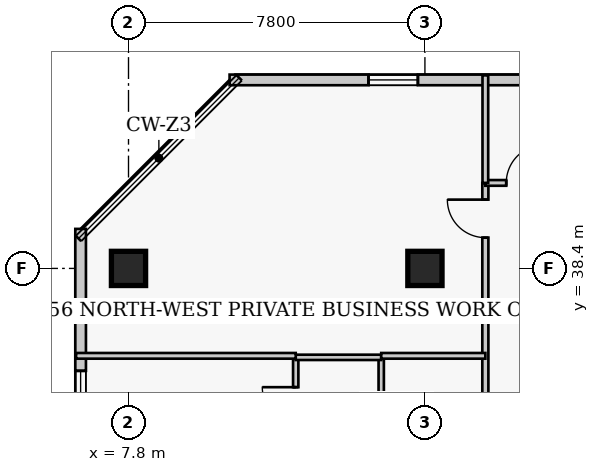
"""IFC4 building model, lengths in metres.
Left out: names, types, materials, properties, quantities, classifications, styles, units other than length and angle.
Written with IfcOpenShell. Run it as: python <this file> out.ifc"""

import sys

from ifc_helpers import new_model, si_unit, direction, frame, frame_2d, origin, origin_2d, place, context, subcontext, project, spatial, rectangle, extrude, element, fill, save


model = new_model("IFC4")
c1 = context("Model", 3, precision=1e-05, world=origin(), true_north=direction((0.0, 1.0)))
c2 = subcontext(c1, "Body", "Model", "MODEL_VIEW")
j1 = project(units=[si_unit("LENGTHUNIT", "METRE"), si_unit("PLANEANGLEUNIT", "RADIAN")], contexts=[c1])
p1 = place(None, origin())
s1 = spatial("IfcSite", under=j1, at=p1, CompositionType="ELEMENT")
p2 = place(p1, origin())
s2 = spatial("IfcBuilding", under=s1, at=p2, CompositionType="ELEMENT")
p3 = place(p2, frame((0.0, 0.0, 224.1)))
s3 = spatial("IfcBuildingStorey", under=s2, at=p3, CompositionType="ELEMENT", Elevation=224.1)
for number, where, z_axis, x_axis in (
    (1, (7.8, 38.4, 0.0), (0.0, 0.0, 1.0), (1.0, 0.0, 0.0)),
    (2, (15.6, 38.4, 0.0), (0.0, 0.0, 1.0), (1.0, 0.0, 0.0)),
):
    element("IfcColumn", number, at=place(p3, frame(where, z_axis=z_axis, x_axis=x_axis)), inside=s3, PredefinedType="COLUMN", context=c2, shape_type="SweptSolid", body=[
        extrude(rectangle(XDim=0.9, YDim=0.9, at=origin_2d()), origin(), (0.0, 0.0, 1.0), 3.9),
    ])
p4 = place(p3, frame((36.29, 43.36, 0.0), z_axis=(0.0, 0.0, 1.0), x_axis=(-1.0, 0.0, 0.0)))
e3 = element("IfcWall", 3, at=p4, inside=s3, PredefinedType="SOLIDWALL", context=c2, shape_type="SweptSolid", body=[
    extrude(rectangle(XDim=25.83, YDim=0.28, at=frame_2d((12.915, 0.0))), origin(), (0.0, 0.0, 1.0), 3.65),
])
p5 = place(p4, frame((3.005, 0.0, 0.85)))
e4 = element("IfcOpeningElement", 4, at=p5, cuts=e3, PredefinedType="OPENING", context=c2, shape_type="SweptSolid", body=[
    extrude(rectangle(XDim=1.3, YDim=1.7, at=frame_2d((0.65, 0.85))), frame((0.0, 0.15, 0.0), z_axis=(0.0, -1.0, 0.0), x_axis=(1.0, 0.0, 0.0)), (0.0, 0.0, 1.0), 0.3),
])
p6 = place(p4, frame((12.265, 0.0, 0.85)))
e5 = element("IfcOpeningElement", 5, at=p6, cuts=e3, PredefinedType="OPENING", context=c2, shape_type="SweptSolid", body=[
    extrude(rectangle(XDim=1.3, YDim=1.7, at=frame_2d((0.65, 0.85))), frame((0.0, 0.15, 0.0), z_axis=(0.0, -1.0, 0.0), x_axis=(1.0, 0.0, 0.0)), (0.0, 0.0, 1.0), 0.3),
])
p7 = place(p4, frame((20.875, 0.0, 0.85)))
e6 = element("IfcOpeningElement", 6, at=p7, cuts=e3, PredefinedType="OPENING", context=c2, shape_type="SweptSolid", body=[
    extrude(rectangle(XDim=1.3, YDim=1.7, at=frame_2d((0.65, 0.85))), frame((0.0, 0.15, 0.0), z_axis=(0.0, -1.0, 0.0), x_axis=(1.0, 0.0, 0.0)), (0.0, 0.0, 1.0), 0.3),
])
p8 = place(p3, frame((6.54, 39.44, 0.0), z_axis=(0.0, 0.0, 1.0), x_axis=(0.0, -1.0, 0.0)))
e7 = element("IfcWall", 7, at=p8, inside=s3, PredefinedType="SOLIDWALL", context=c2, shape_type="SweptSolid", body=[
    extrude(rectangle(XDim=29.88, YDim=0.28, at=frame_2d((14.94, 0.0))), origin(), (0.0, 0.0, 1.0), 3.65),
])
p9 = place(p8, frame((3.735, 0.0, 0.85)))
e8 = element("IfcOpeningElement", 8, at=p9, cuts=e7, PredefinedType="OPENING", context=c2, shape_type="SweptSolid", body=[
    extrude(rectangle(XDim=1.3, YDim=1.7, at=frame_2d((0.65, 0.85))), frame((0.0, 0.15, 0.0), z_axis=(0.0, -1.0, 0.0), x_axis=(1.0, 0.0, 0.0)), (0.0, 0.0, 1.0), 0.3),
])
p10 = place(p8, frame((11.205, 0.0, 0.85)))
e9 = element("IfcOpeningElement", 9, at=p10, cuts=e7, PredefinedType="OPENING", context=c2, shape_type="SweptSolid", body=[
    extrude(rectangle(XDim=1.3, YDim=1.7, at=frame_2d((0.65, 0.85))), frame((0.0, 0.15, 0.0), z_axis=(0.0, -1.0, 0.0), x_axis=(1.0, 0.0, 0.0)), (0.0, 0.0, 1.0), 0.3),
])
p11 = place(p8, frame((17.375, 0.0, 0.85)))
e10 = element("IfcOpeningElement", 10, at=p11, cuts=e7, PredefinedType="OPENING", context=c2, shape_type="SweptSolid", body=[
    extrude(rectangle(XDim=1.3, YDim=1.7, at=frame_2d((0.65, 0.85))), frame((0.0, 0.15, 0.0), z_axis=(0.0, -1.0, 0.0), x_axis=(1.0, 0.0, 0.0)), (0.0, 0.0, 1.0), 0.3),
])
p12 = place(p8, frame((25.495, 0.0, 0.85)))
e11 = element("IfcOpeningElement", 11, at=p12, cuts=e7, PredefinedType="OPENING", context=c2, shape_type="SweptSolid", body=[
    extrude(rectangle(XDim=1.3, YDim=1.7, at=frame_2d((0.65, 0.85))), frame((0.0, 0.15, 0.0), z_axis=(0.0, -1.0, 0.0), x_axis=(1.0, 0.0, 0.0)), (0.0, 0.0, 1.0), 0.3),
])
p13 = place(p3, frame((17.19, 7.55, 0.0), z_axis=(0.0, 0.0, 1.0), x_axis=(0.0, 1.0, 0.0)))
e12 = element("IfcWall", 12, at=p13, inside=s3, PredefinedType="PARTITIONING", context=c2, shape_type="SweptSolid", body=[
    extrude(rectangle(XDim=33.1, YDim=0.16, at=frame_2d((16.55, 0.0))), origin(), (0.0, 0.0, 1.0), 3.65),
])
p14 = place(p13, frame((1.35, 0.0, 0.0)))
e13 = element("IfcOpeningElement", 13, at=p14, cuts=e12, PredefinedType="OPENING", context=c2, shape_type="SweptSolid", body=[
    extrude(rectangle(XDim=0.95, YDim=2.1, at=frame_2d((0.475, 1.05))), frame((0.0, 0.09, 0.0), z_axis=(0.0, -1.0, 0.0), x_axis=(1.0, 0.0, 0.0)), (0.0, 0.0, 1.0), 0.18),
])
p15 = place(p13, frame((7.575, 0.0, 0.0)))
e14 = element("IfcOpeningElement", 14, at=p15, cuts=e12, PredefinedType="OPENING", context=c2, shape_type="SweptSolid", body=[
    extrude(rectangle(XDim=0.95, YDim=2.1, at=frame_2d((0.475, 1.05))), frame((0.0, 0.09, 0.0), z_axis=(0.0, -1.0, 0.0), x_axis=(1.0, 0.0, 0.0)), (0.0, 0.0, 1.0), 0.18),
])
p16 = place(p13, frame((16.375, 0.0, 0.0)))
e15 = element("IfcOpeningElement", 15, at=p16, cuts=e12, PredefinedType="OPENING", context=c2, shape_type="SweptSolid", body=[
    extrude(rectangle(XDim=0.95, YDim=2.1, at=frame_2d((0.475, 1.05))), frame((0.0, 0.09, 0.0), z_axis=(0.0, -1.0, 0.0), x_axis=(1.0, 0.0, 0.0)), (0.0, 0.0, 1.0), 0.18),
])
p17 = place(p13, frame((24.425, 0.0, 0.0)))
e16 = element("IfcOpeningElement", 16, at=p17, cuts=e12, PredefinedType="OPENING", context=c2, shape_type="SweptSolid", body=[
    extrude(rectangle(XDim=0.95, YDim=2.1, at=frame_2d((0.475, 1.05))), frame((0.0, 0.09, 0.0), z_axis=(0.0, -1.0, 0.0), x_axis=(1.0, 0.0, 0.0)), (0.0, 0.0, 1.0), 0.18),
])
p18 = place(p13, frame((31.66, 0.0, 0.0)))
e17 = element("IfcOpeningElement", 17, at=p18, cuts=e12, PredefinedType="OPENING", context=c2, shape_type="SweptSolid", body=[
    extrude(rectangle(XDim=1.0, YDim=2.15, at=frame_2d((0.5, 1.075))), frame((0.0, 0.09, 0.0), z_axis=(0.0, -1.0, 0.0), x_axis=(1.0, 0.0, 0.0)), (0.0, 0.0, 1.0), 0.18),
])
p19 = place(p3, frame((17.19, 40.65, 0.0), z_axis=(0.0, 0.0, 1.0), x_axis=(1.0, 0.0, 0.0)))
e18 = element("IfcWall", 18, at=p19, inside=s3, PredefinedType="PARTITIONING", context=c2, shape_type="SweptSolid", body=[
    extrude(rectangle(XDim=4.91, YDim=0.15, at=frame_2d((2.455, 0.0))), origin(), (0.0, 0.0, 1.0), 3.65),
])
p20 = place(p19, frame((0.55, 0.0, 0.0)))
e19 = element("IfcOpeningElement", 19, at=p20, cuts=e18, PredefinedType="OPENING", context=c2, shape_type="SweptSolid", body=[
    extrude(rectangle(XDim=1.0, YDim=2.15, at=frame_2d((0.5, 1.075))), frame((0.0, 0.085, 0.0), z_axis=(0.0, -1.0, 0.0), x_axis=(1.0, 0.0, 0.0)), (0.0, 0.0, 1.0), 0.17),
])
p21 = place(p3, frame((17.19, 40.65, 0.0), z_axis=(0.0, 0.0, 1.0), x_axis=(0.0, 1.0, 0.0)))
e20 = element("IfcWall", 20, at=p21, inside=s3, PredefinedType="PARTITIONING", context=c2, shape_type="SweptSolid", body=[
    extrude(rectangle(XDim=2.83, YDim=0.15, at=frame_2d((1.415, 0.0))), origin(), (0.0, 0.0, 1.0), 3.65),
])
p22 = place(p3, frame((12.2, 33.61, 0.0), z_axis=(0.0, 0.0, 1.0), x_axis=(0.0, 1.0, 0.0)))
e21 = element("IfcWall", 21, at=p22, inside=s3, PredefinedType="PLUMBINGWALL", context=c2, shape_type="SweptSolid", body=[
    extrude(rectangle(XDim=2.45, YDim=0.14, at=frame_2d((1.225, 0.0))), origin(), (0.0, 0.0, 1.0), 3.65),
])
p23 = place(p22, frame((0.785, 0.0, 0.0)))
e22 = element("IfcOpeningElement", 22, at=p23, cuts=e21, PredefinedType="OPENING", context=c2, shape_type="SweptSolid", body=[
    extrude(rectangle(XDim=0.88, YDim=2.05, at=frame_2d((0.44, 1.025))), frame((0.0, 0.08, 0.0), z_axis=(0.0, -1.0, 0.0), x_axis=(1.0, 0.0, 0.0)), (0.0, 0.0, 1.0), 0.16),
])
p24 = place(p3, frame((14.45, 33.61, 0.0), z_axis=(0.0, 0.0, 1.0), x_axis=(0.0, 1.0, 0.0)))
e23 = element("IfcWall", 23, at=p24, inside=s3, PredefinedType="PLUMBINGWALL", context=c2, shape_type="SweptSolid", body=[
    extrude(rectangle(XDim=2.45, YDim=0.14, at=frame_2d((1.225, 0.0))), origin(), (0.0, 0.0, 1.0), 3.65),
])
p25 = place(p3, frame((12.2, 36.06, 0.0), z_axis=(0.0, 0.0, 1.0), x_axis=(1.0, 0.0, 0.0)))
e24 = element("IfcWall", 24, at=p25, inside=s3, PredefinedType="PLUMBINGWALL", context=c2, shape_type="SweptSolid", body=[
    extrude(rectangle(XDim=2.25, YDim=0.14, at=frame_2d((1.125, 0.0))), origin(), (0.0, 0.0, 1.0), 3.65),
])
p26 = place(p3, frame((6.42, 36.1, 0.0), z_axis=(0.0, 0.0, 1.0), x_axis=(1.0, 0.0, 0.0)))
e25 = element("IfcWall", 25, at=p26, inside=s3, PredefinedType="PARTITIONING", context=c2, shape_type="SweptSolid", body=[
    extrude(rectangle(XDim=5.78, YDim=0.15, at=frame_2d((2.89, 0.0))), origin(), (0.0, 0.0, 1.0), 3.65),
])
p27 = place(p3, frame((14.45, 36.1, 0.0), z_axis=(0.0, 0.0, 1.0), x_axis=(1.0, 0.0, 0.0)))
e26 = element("IfcWall", 26, at=p27, inside=s3, PredefinedType="PARTITIONING", context=c2, shape_type="SweptSolid", body=[
    extrude(rectangle(XDim=2.74, YDim=0.15, at=frame_2d((1.37, 0.0))), origin(), (0.0, 0.0, 1.0), 3.65),
])
p28 = place(p7, origin())
e27 = element("IfcWindow", 27, at=p28, inside=s3, PartitioningType="SINGLE_PANEL", PredefinedType="WINDOW", context=c2, shape_type="SweptSolid", body=[
    extrude(rectangle(XDim=1.3, YDim=1.7, at=frame_2d((0.65, 0.85))), frame((0.0, 0.03, 0.0), z_axis=(0.0, -1.0, 0.0), x_axis=(1.0, 0.0, 0.0)), (0.0, 0.0, 1.0), 0.06),
])
fill(e6, e27)
p29 = place(p9, origin())
e28 = element("IfcWindow", 28, at=p29, inside=s3, PartitioningType="SINGLE_PANEL", PredefinedType="WINDOW", context=c2, shape_type="SweptSolid", body=[
    extrude(rectangle(XDim=1.3, YDim=1.7, at=frame_2d((0.65, 0.85))), frame((0.0, 0.03, 0.0), z_axis=(0.0, -1.0, 0.0), x_axis=(1.0, 0.0, 0.0)), (0.0, 0.0, 1.0), 0.06),
])
fill(e8, e28)
p30 = place(p20, origin())
e29 = element("IfcDoor", 29, at=p30, inside=s3, OperationType="SINGLE_SWING_RIGHT", PredefinedType="DOOR", context=c2, shape_type="SweptSolid", body=[
    extrude(rectangle(XDim=1.0, YDim=2.15, at=frame_2d((0.5, 1.075))), frame((0.0, 0.025, 0.0), z_axis=(0.0, -1.0, 0.0), x_axis=(1.0, 0.0, 0.0)), (0.0, 0.0, 1.0), 0.05),
])
fill(e19, e29)
p31 = place(p23, origin())
e30 = element("IfcDoor", 30, at=p31, inside=s3, OperationType="SINGLE_SWING_RIGHT", PredefinedType="DOOR", context=c2, shape_type="SweptSolid", body=[
    extrude(rectangle(XDim=0.88, YDim=2.05, at=frame_2d((0.44, 1.025))), frame((0.0, 0.025, 0.0), z_axis=(0.0, -1.0, 0.0), x_axis=(1.0, 0.0, 0.0)), (0.0, 0.0, 1.0), 0.05),
])
fill(e22, e30)
p32 = place(p18, origin())
e31 = element("IfcDoor", 31, at=p32, inside=s3, OperationType="SINGLE_SWING_RIGHT", PredefinedType="DOOR", context=c2, shape_type="SweptSolid", body=[
    extrude(rectangle(XDim=1.0, YDim=2.15, at=frame_2d((0.5, 1.075))), frame((0.0, 0.025, 0.0), z_axis=(0.0, -1.0, 0.0), x_axis=(1.0, 0.0, 0.0)), (0.0, 0.0, 1.0), 0.05),
])
fill(e17, e31)
save(model, sys.argv[1])
